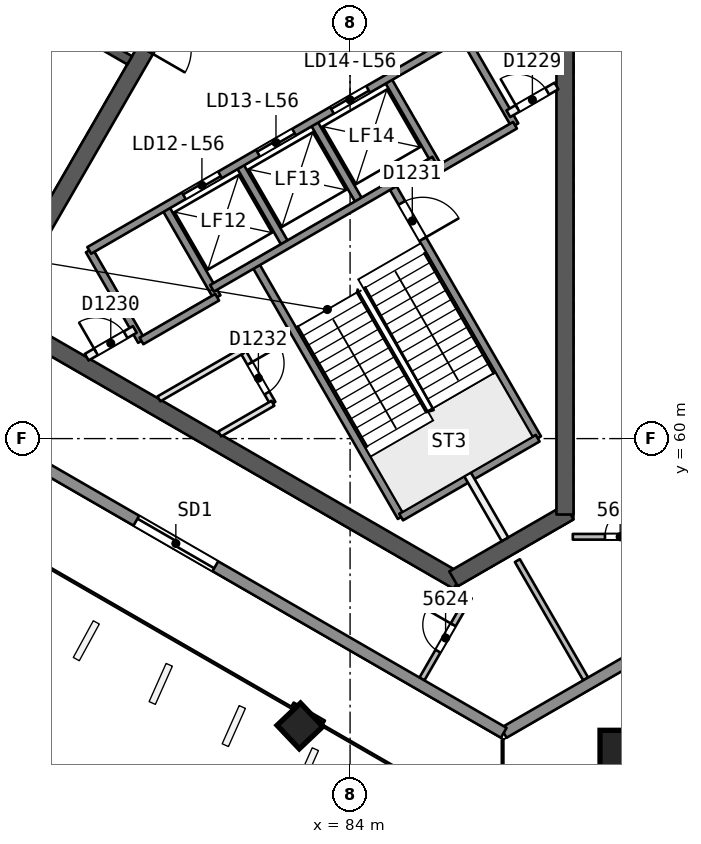
"""IFC4 building model, lengths in metres.
Left out: names, types, materials, properties, quantities, classifications, styles, units other than length and angle.
Written with IfcOpenShell. Run it as: python <this file> out.ifc"""

import sys

from ifc_helpers import new_model, si_unit, direction, frame, frame_2d, origin, origin_2d, place, context, subcontext, project, spatial, rectangle, extrude, element, fill, save


model = new_model("IFC4")
c1 = context("Model", 3, precision=1e-05, world=origin(), true_north=direction((0.0, 1.0)))
c2 = subcontext(c1, "Body", "Model", "MODEL_VIEW")
j1 = project(units=[si_unit("LENGTHUNIT", "METRE"), si_unit("PLANEANGLEUNIT", "RADIAN")], contexts=[c1])
p1 = place(None, origin())
s1 = spatial("IfcSite", under=j1, at=p1, CompositionType="ELEMENT")
p2 = place(p1, origin())
s2 = spatial("IfcBuilding", under=s1, at=p2, CompositionType="ELEMENT")
p3 = place(p2, frame((0.0, 0.0, 228.0)))
s3 = spatial("IfcBuildingStorey", under=s2, at=p3, CompositionType="ELEMENT", Elevation=228.0)
p4 = place(p3, frame((79.63, 71.981, 0.0), z_axis=(0.0, 0.0, 1.0), x_axis=(-0.500002171595, -0.86602415001, 0.0)))
e1 = element("IfcWall", 1, at=p4, inside=s3, PredefinedType="SHEAR", context=c2, shape_type="SweptSolid", body=[
    extrude(rectangle(XDim=10.25, YDim=0.45, at=frame_2d((5.125, 0.0))), origin(), (0.0, 0.0, 1.0), 3.7),
])
p5 = place(p4, frame((0.82, 0.0, 0.0)))
e2 = element("IfcOpeningElement", 2, at=p5, cuts=e1, PredefinedType="OPENING", context=c2, shape_type="SweptSolid", body=[
    extrude(rectangle(XDim=1.2, YDim=2.1, at=frame_2d((0.6, 1.05))), frame((0.0, 0.235, 0.0), z_axis=(0.0, -1.0, 0.0), x_axis=(1.0, 0.0, 0.0)), (0.0, 0.0, 1.0), 0.471),
])
p6 = place(p3, frame((74.617, 63.299, 0.0), z_axis=(0.0, 0.0, 1.0), x_axis=(0.86602594008, -0.499999071108, 0.0)))
e3 = element("IfcWall", 3, at=p6, inside=s3, PredefinedType="SHEAR", context=c2, shape_type="SweptSolid", body=[
    extrude(rectangle(XDim=14.108, YDim=0.45, at=frame_2d((7.054, 0.0))), origin(), (0.0, 0.0, 1.0), 3.7),
])
p7 = place(p3, frame((86.723, 56.31, 0.0), z_axis=(0.0, 0.0, 1.0), x_axis=(0.866042179588, 0.49997094233, 0.0)))
e4 = element("IfcWall", 4, at=p7, inside=s3, PredefinedType="SHEAR", context=c2, shape_type="SweptSolid", body=[
    extrude(rectangle(XDim=3.515, YDim=0.45, at=frame_2d((1.758, 0.0))), origin(), (0.0, 0.0, 1.0), 3.7),
])
p8 = place(p3, frame((89.655, 58.002, 0.0), z_axis=(0.0, 0.0, 1.0), x_axis=(0.0, 1.0, 0.0)))
e5 = element("IfcWall", 5, at=p8, inside=s3, PredefinedType="SHEAR", context=c2, shape_type="SweptSolid", body=[
    extrude(rectangle(XDim=14.204, YDim=0.45, at=frame_2d((7.102, 0.0))), origin(), (0.0, 0.0, 1.0), 3.7),
])
p9 = place(p3, frame((64.7, 77.748, 0.0), z_axis=(0.0, 0.0, 1.0), x_axis=(0.866026492143, -0.499998114903, 0.0)))
e6 = element("IfcWall", 6, at=p9, inside=s3, PredefinedType="SHEAR", context=c2, shape_type="SweptSolid", body=[
    extrude(rectangle(XDim=15.588, YDim=0.25, at=frame_2d((7.794, 0.0))), origin(), (0.0, 0.0, 1.0), 3.3),
])
p10 = place(p9, frame((2.462, 0.0, 0.0)))
e7 = element("IfcOpeningElement", 7, at=p10, cuts=e6, PredefinedType="OPENING", context=c2, shape_type="SweptSolid", body=[
    extrude(rectangle(XDim=1.0, YDim=2.1, at=frame_2d((0.5, 1.05))), frame((0.0, 0.135, 0.0), z_axis=(0.0, -1.0, 0.0), x_axis=(1.0, 0.0, 0.0)), (0.0, 0.0, 1.0), 0.271),
])
p11 = place(p9, frame((9.474, 0.0, 0.0)))
e8 = element("IfcOpeningElement", 8, at=p11, cuts=e6, PredefinedType="OPENING", context=c2, shape_type="SweptSolid", body=[
    extrude(rectangle(XDim=1.1, YDim=2.1, at=frame_2d((0.55, 1.05))), frame((0.0, 0.135, 0.0), z_axis=(0.0, -1.0, 0.0), x_axis=(1.0, 0.0, 0.0)), (0.0, 0.0, 1.0), 0.271),
])
p12 = place(p9, frame((12.906, 0.0, 0.0)))
e9 = element("IfcOpeningElement", 9, at=p12, cuts=e6, PredefinedType="OPENING", context=c2, shape_type="SweptSolid", body=[
    extrude(rectangle(XDim=1.0, YDim=2.1, at=frame_2d((0.5, 1.05))), frame((0.0, 0.135, 0.0), z_axis=(0.0, -1.0, 0.0), x_axis=(1.0, 0.0, 0.0)), (0.0, 0.0, 1.0), 0.271),
])
p13 = place(p3, frame((82.69, 52.406, 0.0), z_axis=(-0.008376454378, 0.028163354484, 0.999568237028), x_axis=(-0.500239696169, -0.865651362756, 0.020198132002)))
e10 = element("IfcColumn", 10, at=p13, inside=s3, PredefinedType="COLUMN", context=c2, shape_type="SweptSolid", body=[
    extrude(rectangle(XDim=0.85, YDim=0.85, at=origin_2d()), origin(), (0.0, 0.0, 1.0), 3.702),
])
p14 = place(p3, frame((91.548, 51.338, 0.0), z_axis=(-0.017607037296, 0.030466109479, 0.999380712447), x_axis=(0.500055571201, -0.865278125299, 0.035187946645)))
e11 = element("IfcColumn", 11, at=p14, inside=s3, PredefinedType="COLUMN", context=c2, shape_type="SweptSolid", body=[
    extrude(rectangle(XDim=1.9, YDim=1.9, at=origin_2d()), origin(), (0.0, 0.0, 1.0), 3.702),
])
p15 = place(p3, frame((89.861, 57.417, 0.0), z_axis=(0.0, 0.0, 1.0), x_axis=(1.0, 0.0, 0.0)))
e12 = element("IfcWall", 12, at=p15, inside=s3, PredefinedType="PARTITIONING", context=c2, shape_type="SweptSolid", body=[
    extrude(rectangle(XDim=2.492, YDim=0.15, at=frame_2d((1.246, 0.0))), origin(), (0.0, 0.0, 1.0), 3.3),
])
p16 = place(p15, frame((0.846, 0.0, 0.0)))
e13 = element("IfcOpeningElement", 13, at=p16, cuts=e12, PredefinedType="OPENING", context=c2, shape_type="SweptSolid", body=[
    extrude(rectangle(XDim=0.8, YDim=2.1, at=frame_2d((0.4, 1.05))), frame((0.0, 0.085, 0.0), z_axis=(0.0, -1.0, 0.0), x_axis=(1.0, 0.0, 0.0)), (0.0, 0.0, 1.0), 0.171),
])
p17 = place(p3, frame((88.402, 56.789, 0.0), z_axis=(0.0, 0.0, 1.0), x_axis=(0.500032055595, -0.866006895687, 0.0)))
e14 = element("IfcWall", 14, at=p17, inside=s3, PredefinedType="PARTITIONING", context=c2, shape_type="SweptSolid", body=[
    extrude(rectangle(XDim=3.595, YDim=0.15, at=frame_2d((1.797, 0.0))), origin(), (0.0, 0.0, 1.0), 3.3),
])
p18 = place(p3, frame((85.89, 53.674, 0.0), z_axis=(0.0, 0.0, 1.0), x_axis=(0.500047477074, 0.865997991148, 0.0)))
e15 = element("IfcWall", 15, at=p18, inside=s3, PredefinedType="PARTITIONING", context=c2, shape_type="SweptSolid", body=[
    extrude(rectangle(XDim=2.492, YDim=0.15, at=frame_2d((1.246, 0.0))), origin(), (0.0, 0.0, 1.0), 3.3),
])
p19 = place(p18, frame((0.846, 0.0, 0.0)))
e16 = element("IfcOpeningElement", 16, at=p19, cuts=e15, PredefinedType="OPENING", context=c2, shape_type="SweptSolid", body=[
    extrude(rectangle(XDim=0.8, YDim=2.1, at=frame_2d((0.4, 1.05))), frame((0.0, 0.085, 0.0), z_axis=(0.0, -1.0, 0.0), x_axis=(1.0, 0.0, 0.0)), (0.0, 0.0, 1.0), 0.171),
])
p20 = place(p3, frame((92.503, 54.834, 0.0), z_axis=(0.0, 0.0, 1.0), x_axis=(-0.866011086668, -0.500024797153, 0.0)))
e17 = element("IfcWall", 17, at=p20, inside=s3, PredefinedType="SOLIDWALL", context=c2, shape_type="SweptSolid", body=[
    extrude(rectangle(XDim=5.149, YDim=0.3, at=frame_2d((2.575, 0.0))), origin(), (0.0, 0.0, 1.0), 3.3),
])
p21 = place(p3, frame((88.043, 52.259, 0.0), z_axis=(0.0, 0.0, 1.0), x_axis=(-0.86602387423, 0.500002649256, 0.0)))
e18 = element("IfcWall", 18, at=p21, inside=s3, PredefinedType="SOLIDWALL", context=c2, shape_type="SweptSolid", body=[
    extrude(rectangle(XDim=50.333, YDim=0.3, at=frame_2d((25.167, 0.0))), origin(), (0.0, 0.0, 1.0), 3.3),
])
p22 = place(p21, frame((23.187, 0.0, 0.0)))
e19 = element("IfcOpeningElement", 19, at=p22, cuts=e18, PredefinedType="OPENING", context=c2, shape_type="SweptSolid", body=[
    extrude(rectangle(XDim=2.4, YDim=2.4, at=frame_2d((1.2, 1.2))), frame((0.0, 0.161, 0.0), z_axis=(0.0, -1.0, 0.0), x_axis=(1.0, 0.0, 0.0)), (0.0, 0.0, 1.0), 0.321),
])
p23 = place(p21, frame((28.799, 0.0, 0.0)))
e20 = element("IfcOpeningElement", 20, at=p23, cuts=e18, PredefinedType="OPENING", context=c2, shape_type="SweptSolid", body=[
    extrude(rectangle(XDim=2.4, YDim=2.4, at=frame_2d((1.2, 1.2))), frame((0.0, 0.161, 0.0), z_axis=(0.0, -1.0, 0.0), x_axis=(1.0, 0.0, 0.0)), (0.0, 0.0, 1.0), 0.321),
])
p24 = place(p21, frame((39.164, 0.0, 0.0)))
e21 = element("IfcOpeningElement", 21, at=p24, cuts=e18, PredefinedType="OPENING", context=c2, shape_type="SweptSolid", body=[
    extrude(rectangle(XDim=2.4, YDim=2.4, at=frame_2d((1.2, 1.2))), frame((0.0, 0.161, 0.0), z_axis=(0.0, -1.0, 0.0), x_axis=(1.0, 0.0, 0.0)), (0.0, 0.0, 1.0), 0.321),
])
p25 = place(p21, frame((18.354, 0.0, 0.0)))
e22 = element("IfcOpeningElement", 22, at=p25, cuts=e18, PredefinedType="OPENING", context=c2, shape_type="SweptSolid", body=[
    extrude(rectangle(XDim=2.4, YDim=2.4, at=frame_2d((1.2, 1.2))), frame((0.0, 0.161, 0.0), z_axis=(0.0, -1.0, 0.0), x_axis=(1.0, 0.0, 0.0)), (0.0, 0.0, 1.0), 0.321),
])
p26 = place(p21, frame((8.763, 0.0, 0.0)))
e23 = element("IfcOpeningElement", 23, at=p26, cuts=e18, PredefinedType="OPENING", context=c2, shape_type="SweptSolid", body=[
    extrude(rectangle(XDim=2.4, YDim=2.4, at=frame_2d((1.2, 1.2))), frame((0.0, 0.161, 0.0), z_axis=(0.0, -1.0, 0.0), x_axis=(1.0, 0.0, 0.0)), (0.0, 0.0, 1.0), 0.321),
])
p27 = place(p3, frame((77.135, 64.952, 0.0), z_axis=(0.0, 0.0, 1.0), x_axis=(0.499996545922, -0.866027397988, 0.0)))
e24 = element("IfcWall", 24, at=p27, inside=s3, PredefinedType="SOLIDWALL", context=c2, shape_type="SweptSolid", body=[
    extrude(rectangle(XDim=2.75, YDim=0.2, at=frame_2d((1.375, 0.0))), origin(), (0.0, 0.0, 1.0), 3.3),
])
p28 = place(p3, frame((81.169, 62.315, 0.0), z_axis=(0.0, 0.0, 1.0), x_axis=(0.499995408039, -0.866028054938, 0.0)))
e25 = element("IfcWall", 25, at=p28, inside=s3, PredefinedType="PARTITIONING", context=c2, shape_type="SweptSolid", body=[
    extrude(rectangle(XDim=1.6, YDim=0.15, at=frame_2d((0.8, 0.0))), origin(), (0.0, 0.0, 1.0), 3.3),
])
p29 = place(p28, frame((0.387, 0.0, 0.0)))
e26 = element("IfcOpeningElement", 26, at=p29, cuts=e25, PredefinedType="OPENING", context=c2, shape_type="SweptSolid", body=[
    extrude(rectangle(XDim=0.9, YDim=2.1, at=frame_2d((0.45, 1.05))), frame((0.0, 0.085, 0.0), z_axis=(0.0, -1.0, 0.0), x_axis=(1.0, 0.0, 0.0)), (0.0, 0.0, 1.0), 0.171),
])
p30 = place(p3, frame((79.127, 66.102, 0.0), z_axis=(0.0, 0.0, 1.0), x_axis=(0.499996545922, -0.866027397988, 0.0)))
e27 = element("IfcWall", 27, at=p30, inside=s3, PredefinedType="SOLIDWALL", context=c2, shape_type="SweptSolid", body=[
    extrude(rectangle(XDim=2.75, YDim=0.2, at=frame_2d((1.375, 0.0))), origin(), (0.0, 0.0, 1.0), 3.3),
])
p31 = place(p3, frame((81.493, 64.604, 0.0), z_axis=(0.0, 0.0, 1.0), x_axis=(0.500006057782, -0.866021906294, 0.0)))
e28 = element("IfcWall", 28, at=p31, inside=s3, PredefinedType="SOLIDWALL", context=c2, shape_type="SweptSolid", body=[
    extrude(rectangle(XDim=7.7, YDim=0.2, at=frame_2d((3.85, 0.0))), origin(), (0.0, 0.0, 1.0), 3.3),
])
p32 = place(p3, frame((81.076, 67.227, 0.0), z_axis=(0.0, 0.0, 1.0), x_axis=(0.50000366821, -0.866023285932, 0.0)))
e29 = element("IfcWall", 29, at=p32, inside=s3, PredefinedType="SOLIDWALL", context=c2, shape_type="SweptSolid", body=[
    extrude(rectangle(XDim=2.48, YDim=0.2, at=frame_2d((1.24, 0.0))), origin(), (0.0, 0.0, 1.0), 3.3),
])
p33 = place(p3, frame((87.09, 59.06, 0.0), z_axis=(0.0, 0.0, 1.0), x_axis=(0.500011643316, -0.866018681408, 0.0)))
e30 = element("IfcWall", 30, at=p33, inside=s3, PredefinedType="PARTITIONING", context=c2, shape_type="SweptSolid", body=[
    extrude(rectangle(XDim=1.973, YDim=0.2, at=frame_2d((0.987, 0.0))), origin(), (0.0, 0.0, 1.0), 3.3),
])
p34 = place(p3, frame((83.024, 68.352, 0.0), z_axis=(0.0, 0.0, 1.0), x_axis=(0.50000366821, -0.866023285932, 0.0)))
e31 = element("IfcWall", 31, at=p34, inside=s3, PredefinedType="SOLIDWALL", context=c2, shape_type="SweptSolid", body=[
    extrude(rectangle(XDim=2.48, YDim=0.2, at=frame_2d((1.24, 0.0))), origin(), (0.0, 0.0, 1.0), 3.3),
])
p35 = place(p3, frame((85.087, 66.679, 0.0), z_axis=(0.0, 0.0, 1.0), x_axis=(0.500019787375, -0.866013979237, 0.0)))
e32 = element("IfcWall", 32, at=p35, inside=s3, PredefinedType="SOLIDWALL", context=c2, shape_type="SweptSolid", body=[
    extrude(rectangle(XDim=7.7, YDim=0.2, at=frame_2d((3.85, 0.0))), origin(), (0.0, 0.0, 1.0), 3.3),
])
p36 = place(p35, frame((0.55, 0.0, 0.0)))
e33 = element("IfcOpeningElement", 33, at=p36, cuts=e32, PredefinedType="OPENING", context=c2, shape_type="SweptSolid", body=[
    extrude(rectangle(XDim=1.1, YDim=2.1, at=frame_2d((0.55, 1.05))), frame((0.0, 0.11, 0.0), z_axis=(0.0, -1.0, 0.0), x_axis=(1.0, 0.0, 0.0)), (0.0, 0.0, 1.0), 0.221),
])
for number, where, z_axis, x_axis in (
    (34, (84.973, 69.477, 0.0), (0.0, 0.0, 1.0), (0.5, -0.866, 0.0)),
    (35, (86.965, 70.626, 0.0), (0.0, 0.0, 1.0), (0.5, -0.866, 0.0)),
):
    element("IfcWall", number, at=place(p3, frame(where, z_axis=z_axis, x_axis=x_axis)), inside=s3, PredefinedType="SOLIDWALL", context=c2, shape_type="SweptSolid", body=[
        extrude(rectangle(XDim=2.75, YDim=0.2, at=frame_2d((1.375, 0.0))), origin(), (0.0, 0.0, 1.0), 3.3),
    ])
p37 = place(p3, frame((77.135, 64.952, 0.0), z_axis=(0.0, 0.0, 1.0), x_axis=(0.866031916153, 0.499988720078, 0.0)))
e36 = element("IfcWall", 36, at=p37, inside=s3, PredefinedType="SOLIDWALL", context=c2, shape_type="SweptSolid", body=[
    extrude(rectangle(XDim=11.35, YDim=0.2, at=frame_2d((5.675, 0.0))), origin(), (0.0, 0.0, 1.0), 3.3),
])
p38 = place(p37, frame((2.875, 0.0, 0.0)))
e37 = element("IfcOpeningElement", 37, at=p38, cuts=e36, PredefinedType="OPENING", context=c2, shape_type="SweptSolid", body=[
    extrude(rectangle(XDim=1.1, YDim=2.1, at=frame_2d((0.55, 1.05))), frame((0.0, 0.11, 0.0), z_axis=(0.0, -1.0, 0.0), x_axis=(1.0, 0.0, 0.0)), (0.0, 0.0, 1.0), 0.221),
])
p39 = place(p37, frame((5.125, 0.0, 0.0)))
e38 = element("IfcOpeningElement", 38, at=p39, cuts=e36, PredefinedType="OPENING", context=c2, shape_type="SweptSolid", body=[
    extrude(rectangle(XDim=1.1, YDim=2.1, at=frame_2d((0.55, 1.05))), frame((0.0, 0.11, 0.0), z_axis=(0.0, -1.0, 0.0), x_axis=(1.0, 0.0, 0.0)), (0.0, 0.0, 1.0), 0.221),
])
p40 = place(p37, frame((7.375, 0.0, 0.0)))
e39 = element("IfcOpeningElement", 39, at=p40, cuts=e36, PredefinedType="OPENING", context=c2, shape_type="SweptSolid", body=[
    extrude(rectangle(XDim=1.1, YDim=2.1, at=frame_2d((0.55, 1.05))), frame((0.0, 0.11, 0.0), z_axis=(0.0, -1.0, 0.0), x_axis=(1.0, 0.0, 0.0)), (0.0, 0.0, 1.0), 0.221),
])
p41 = place(p3, frame((77.07, 62.143, 0.0), z_axis=(0.0, 0.0, 1.0), x_axis=(0.866013036001, 0.500021421018, 0.0)))
e40 = element("IfcWall", 40, at=p41, inside=s3, PredefinedType="PARTITIONING", context=c2, shape_type="SweptSolid", body=[
    extrude(rectangle(XDim=1.461, YDim=0.2, at=frame_2d((0.73, 0.0))), origin(), (0.0, 0.0, 1.0), 3.3),
])
p42 = place(p41, frame((0.281, 0.0, 0.0)))
e41 = element("IfcOpeningElement", 41, at=p42, cuts=e40, PredefinedType="OPENING", context=c2, shape_type="SweptSolid", body=[
    extrude(rectangle(XDim=0.9, YDim=2.1, at=frame_2d((0.45, 1.05))), frame((0.0, 0.11, 0.0), z_axis=(0.0, -1.0, 0.0), x_axis=(1.0, 0.0, 0.0)), (0.0, 0.0, 1.0), 0.221),
])
p43 = place(p3, frame((88.165, 68.548, 0.0), z_axis=(0.0, 0.0, 1.0), x_axis=(0.866013036001, 0.500021421018, 0.0)))
e42 = element("IfcWall", 42, at=p43, inside=s3, PredefinedType="PARTITIONING", context=c2, shape_type="SweptSolid", body=[
    extrude(rectangle(XDim=1.461, YDim=0.2, at=frame_2d((0.73, 0.0))), origin(), (0.0, 0.0, 1.0), 3.3),
])
p44 = place(p43, frame((0.281, 0.0, 0.0)))
e43 = element("IfcOpeningElement", 43, at=p44, cuts=e42, PredefinedType="OPENING", context=c2, shape_type="SweptSolid", body=[
    extrude(rectangle(XDim=0.9, YDim=2.1, at=frame_2d((0.45, 1.05))), frame((0.0, 0.11, 0.0), z_axis=(0.0, -1.0, 0.0), x_axis=(1.0, 0.0, 0.0)), (0.0, 0.0, 1.0), 0.221),
])
p45 = place(p3, frame((80.367, 63.954, 0.0), z_axis=(0.0, 0.0, 1.0), x_axis=(0.866026575979, 0.499997969693, 0.0)))
e44 = element("IfcWall", 44, at=p45, inside=s3, PredefinedType="SOLIDWALL", context=c2, shape_type="SweptSolid", body=[
    extrude(rectangle(XDim=6.75, YDim=0.2, at=frame_2d((3.375, 0.0))), origin(), (0.0, 0.0, 1.0), 3.3),
])
p46 = place(p3, frame((78.51, 62.57, 0.0), z_axis=(0.0, 0.0, 1.0), x_axis=(0.866053019151, 0.499952165731, 0.0)))
e45 = element("IfcWall", 45, at=p46, inside=s3, PredefinedType="SOLIDWALL", context=c2, shape_type="SweptSolid", body=[
    extrude(rectangle(XDim=2.3, YDim=0.2, at=frame_2d((1.15, 0.0))), origin(), (0.0, 0.0, 1.0), 3.3),
])
p47 = place(p3, frame((86.348, 67.095, 0.0), z_axis=(0.0, 0.0, 1.0), x_axis=(0.86602648383, 0.499998129301, 0.0)))
e46 = element("IfcWall", 46, at=p47, inside=s3, PredefinedType="SOLIDWALL", context=c2, shape_type="SweptSolid", body=[
    extrude(rectangle(XDim=2.3, YDim=0.2, at=frame_2d((1.15, 0.0))), origin(), (0.0, 0.0, 1.0), 3.3),
])
p48 = place(p3, frame((78.97, 61.046, 0.0), z_axis=(0.0, 0.0, 1.0), x_axis=(0.866033475577, 0.499986018985, 0.0)))
e47 = element("IfcWall", 47, at=p48, inside=s3, PredefinedType="PARTITIONING", context=c2, shape_type="SweptSolid", body=[
    extrude(rectangle(XDim=2.539, YDim=0.15, at=frame_2d((1.27, 0.0))), origin(), (0.0, 0.0, 1.0), 3.3),
])
p49 = place(p3, frame((80.57, 60.122, 0.0), z_axis=(0.0, 0.0, 1.0), x_axis=(0.866039608017, 0.49997539674, 0.0)))
e48 = element("IfcWall", 48, at=p49, inside=s3, PredefinedType="PARTITIONING", context=c2, shape_type="SweptSolid", body=[
    extrude(rectangle(XDim=1.615, YDim=0.15, at=frame_2d((0.808, 0.0))), origin(), (0.0, 0.0, 1.0), 3.3),
])
p50 = place(p3, frame((85.343, 57.935, 0.0), z_axis=(0.0, 0.0, 1.0), x_axis=(0.866004344652, 0.500036473714, 0.0)))
e49 = element("IfcWall", 49, at=p50, inside=s3, PredefinedType="SOLIDWALL", context=c2, shape_type="SweptSolid", body=[
    extrude(rectangle(XDim=4.15, YDim=0.2, at=frame_2d((2.075, 0.0))), origin(), (0.0, 0.0, 1.0), 3.3),
])
p51 = place(p16, origin())
e50 = element("IfcDoor", 50, at=p51, inside=s3, OperationType="SINGLE_SWING_RIGHT", PredefinedType="NOTDEFINED", context=c2, shape_type="SweptSolid", body=[
    extrude(rectangle(XDim=0.8, YDim=2.1, at=frame_2d((0.4, 1.05))), frame((0.0, 0.025, 0.0), z_axis=(0.0, -1.0, 0.0), x_axis=(1.0, 0.0, 0.0)), (0.0, 0.0, 1.0), 0.05),
])
fill(e13, e50)
p52 = place(p19, origin())
e51 = element("IfcDoor", 51, at=p52, inside=s3, OperationType="SINGLE_SWING_RIGHT", PredefinedType="NOTDEFINED", context=c2, shape_type="SweptSolid", body=[
    extrude(rectangle(XDim=0.8, YDim=2.1, at=frame_2d((0.4, 1.05))), frame((0.0, 0.025, 0.0), z_axis=(0.0, -1.0, 0.0), x_axis=(1.0, 0.0, 0.0)), (0.0, 0.0, 1.0), 0.05),
])
fill(e16, e51)
p53 = place(p26, origin())
e52 = element("IfcDoor", 52, at=p53, inside=s3, OperationType="SLIDING_TO_LEFT", PredefinedType="NOTDEFINED", context=c2, shape_type="SweptSolid", body=[
    extrude(rectangle(XDim=2.4, YDim=2.4, at=frame_2d((1.2, 1.2))), frame((0.0, 0.025, 0.0), z_axis=(0.0, -1.0, 0.0), x_axis=(1.0, 0.0, 0.0)), (0.0, 0.0, 1.0), 0.05),
])
fill(e23, e52)
p54 = place(p38, origin())
e53 = element("IfcDoor", 53, at=p54, inside=s3, OperationType="SLIDING_TO_LEFT", PredefinedType="NOTDEFINED", context=c2, shape_type="SweptSolid", body=[
    extrude(rectangle(XDim=1.1, YDim=2.1, at=frame_2d((0.55, 1.05))), frame((0.0, 0.025, 0.0), z_axis=(0.0, -1.0, 0.0), x_axis=(1.0, 0.0, 0.0)), (0.0, 0.0, 1.0), 0.05),
])
fill(e37, e53)
p55 = place(p39, origin())
e54 = element("IfcDoor", 54, at=p55, inside=s3, OperationType="SLIDING_TO_RIGHT", PredefinedType="NOTDEFINED", context=c2, shape_type="SweptSolid", body=[
    extrude(rectangle(XDim=1.1, YDim=2.1, at=frame_2d((0.55, 1.05))), frame((0.0, 0.025, 0.0), z_axis=(0.0, -1.0, 0.0), x_axis=(1.0, 0.0, 0.0)), (0.0, 0.0, 1.0), 0.05),
])
fill(e38, e54)
p56 = place(p40, origin())
e55 = element("IfcDoor", 55, at=p56, inside=s3, OperationType="SLIDING_TO_LEFT", PredefinedType="NOTDEFINED", context=c2, shape_type="SweptSolid", body=[
    extrude(rectangle(XDim=1.1, YDim=2.1, at=frame_2d((0.55, 1.05))), frame((0.0, 0.025, 0.0), z_axis=(0.0, -1.0, 0.0), x_axis=(1.0, 0.0, 0.0)), (0.0, 0.0, 1.0), 0.05),
])
fill(e39, e55)
p57 = place(p44, origin())
e56 = element("IfcDoor", 56, at=p57, inside=s3, OperationType="SINGLE_SWING_LEFT", PredefinedType="NOTDEFINED", context=c2, shape_type="SweptSolid", body=[
    extrude(rectangle(XDim=0.9, YDim=2.1, at=frame_2d((0.45, 1.05))), frame((0.0, 0.025, 0.0), z_axis=(0.0, -1.0, 0.0), x_axis=(1.0, 0.0, 0.0)), (0.0, 0.0, 1.0), 0.05),
])
fill(e43, e56)
p58 = place(p42, origin())
e57 = element("IfcDoor", 57, at=p58, inside=s3, OperationType="SINGLE_SWING_LEFT", PredefinedType="NOTDEFINED", context=c2, shape_type="SweptSolid", body=[
    extrude(rectangle(XDim=0.9, YDim=2.1, at=frame_2d((0.45, 1.05))), frame((0.0, 0.025, 0.0), z_axis=(0.0, -1.0, 0.0), x_axis=(1.0, 0.0, 0.0)), (0.0, 0.0, 1.0), 0.05),
])
fill(e41, e57)
p59 = place(p36, origin())
e58 = element("IfcDoor", 58, at=p59, inside=s3, OperationType="SINGLE_SWING_RIGHT", PredefinedType="NOTDEFINED", context=c2, shape_type="SweptSolid", body=[
    extrude(rectangle(XDim=1.1, YDim=2.1, at=frame_2d((0.55, 1.05))), frame((0.0, 0.025, 0.0), z_axis=(0.0, -1.0, 0.0), x_axis=(1.0, 0.0, 0.0)), (0.0, 0.0, 1.0), 0.05),
])
fill(e33, e58)
p60 = place(p29, origin())
e59 = element("IfcDoor", 59, at=p60, inside=s3, OperationType="SINGLE_SWING_LEFT", PredefinedType="NOTDEFINED", context=c2, shape_type="SweptSolid", body=[
    extrude(rectangle(XDim=0.9, YDim=2.1, at=frame_2d((0.45, 1.05))), frame((0.0, 0.025, 0.0), z_axis=(0.0, -1.0, 0.0), x_axis=(1.0, 0.0, 0.0)), (0.0, 0.0, 1.0), 0.05),
])
fill(e26, e59)
save(model, sys.argv[1])
